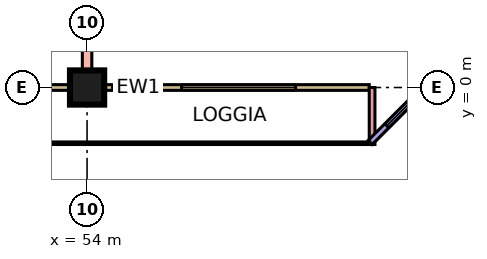
"""IFC4 building model, lengths in metres.
Left out: names, types, materials, properties, quantities, classifications, styles, units other than length and angle.
Written with IfcOpenShell. Run it as: python <this file> out.ifc"""

import sys

from ifc_helpers import new_model, si_unit, direction, frame, frame_2d, origin, origin_2d, place, context, subcontext, project, spatial, rectangle, extrude, element, fill, save


model = new_model("IFC4")
c1 = context("Model", 3, precision=1e-05, world=origin(), true_north=direction((0.0, 1.0)))
c2 = subcontext(c1, "Body", "Model", "MODEL_VIEW")
j1 = project(units=[si_unit("LENGTHUNIT", "METRE"), si_unit("PLANEANGLEUNIT", "RADIAN")], contexts=[c1])
p1 = place(None, origin())
s1 = spatial("IfcSite", under=j1, at=p1, CompositionType="ELEMENT")
p2 = place(p1, origin())
s2 = spatial("IfcBuilding", under=s1, at=p2, CompositionType="ELEMENT")
p3 = place(p2, frame((0.0, 0.0, 206.15)))
s3 = spatial("IfcBuildingStorey", under=s2, at=p3, CompositionType="ELEMENT", Elevation=206.15)
p4 = place(p3, frame((54.0, 0.0, 0.0), z_axis=(0.0, 0.0, 1.0), x_axis=(1.0, 0.0, 0.0)))
e1 = element("IfcColumn", 1, at=p4, inside=s3, PredefinedType="COLUMN", context=c2, shape_type="SweptSolid", body=[
    extrude(rectangle(XDim=0.9, YDim=0.9, at=origin_2d()), origin(), (0.0, 0.0, 1.0), 5.5),
])
p5 = place(p3, frame((48.075, 0.0, 0.0), z_axis=(0.0, 0.0, 1.0), x_axis=(1.0, 0.0, 0.0)))
e2 = element("IfcWall", 2, at=p5, inside=s3, PredefinedType="SOLIDWALL", context=c2, shape_type="SweptSolid", body=[
    extrude(rectangle(XDim=13.35, YDim=0.15, at=frame_2d((6.675, 0.0))), origin(), (0.0, 0.0, 1.0), 5.1),
])
p6 = place(p5, frame((1.188, 0.0, 0.45)))
e3 = element("IfcOpeningElement", 3, at=p6, cuts=e2, PredefinedType="OPENING", context=c2, shape_type="SweptSolid", body=[
    extrude(rectangle(XDim=3.0, YDim=3.6, at=frame_2d((1.5, 1.8))), frame((0.0, 0.085, 0.0), z_axis=(0.0, -1.0, 0.0), x_axis=(1.0, 0.0, 0.0)), (0.0, 0.0, 1.0), 0.17),
])
p7 = place(p5, frame((8.413, 0.0, 0.45)))
e4 = element("IfcOpeningElement", 4, at=p7, cuts=e2, PredefinedType="OPENING", context=c2, shape_type="SweptSolid", body=[
    extrude(rectangle(XDim=3.0, YDim=3.6, at=frame_2d((1.5, 1.8))), frame((0.0, 0.085, 0.0), z_axis=(0.0, -1.0, 0.0), x_axis=(1.0, 0.0, 0.0)), (0.0, 0.0, 1.0), 0.17),
])
p8 = place(p3, frame((61.5, -1.5, 0.0), z_axis=(0.0, 0.0, 1.0), x_axis=(0.0, 1.0, 0.0)))
e5 = element("IfcWall", 5, at=p8, inside=s3, PredefinedType="SOLIDWALL", context=c2, shape_type="SweptSolid", body=[
    extrude(rectangle(XDim=1.5, YDim=0.15, at=frame_2d((0.75, 0.0))), origin(), (0.0, 0.0, 1.0), 5.1),
])
p9 = place(p3, frame((61.447, -1.447, 0.0), z_axis=(0.0, 0.0, 1.0), x_axis=(0.707106781187, 0.707106781187, 0.0)))
e6 = element("IfcWall", 6, at=p9, inside=s3, PredefinedType="SOLIDWALL", context=c2, shape_type="SweptSolid", body=[
    extrude(rectangle(XDim=4.243, YDim=0.15, at=frame_2d((2.121, 0.0))), origin(), (0.0, 0.0, 1.0), 5.1),
])
p10 = place(p9, frame((0.621, 0.0, 0.45)))
e7 = element("IfcOpeningElement", 7, at=p10, cuts=e6, PredefinedType="OPENING", context=c2, shape_type="SweptSolid", body=[
    extrude(rectangle(XDim=3.0, YDim=3.6, at=frame_2d((1.5, 1.8))), frame((0.0, 0.085, 0.0), z_axis=(0.0, -1.0, 0.0), x_axis=(1.0, 0.0, 0.0)), (0.0, 0.0, 1.0), 0.17),
])
p11 = place(p3, frame((54.0, 0.074, 0.0), z_axis=(0.0, 0.0, 1.0), x_axis=(0.0, 1.0, 0.0)))
e8 = element("IfcWall", 8, at=p11, inside=s3, PredefinedType="PARTITIONING", context=c2, shape_type="SweptSolid", body=[
    extrude(rectangle(XDim=11.527, YDim=0.25, at=frame_2d((5.764, 0.0))), origin(), (0.0, 0.0, 1.0), 5.1),
])
p12 = place(p7, origin())
e9 = element("IfcWindow", 9, at=p12, inside=s3, PartitioningType="SINGLE_PANEL", PredefinedType="WINDOW", context=c2, shape_type="SweptSolid", body=[
    extrude(rectangle(XDim=3.0, YDim=3.6, at=frame_2d((1.5, 1.8))), frame((0.0, 0.03, 0.0), z_axis=(0.0, -1.0, 0.0), x_axis=(1.0, 0.0, 0.0)), (0.0, 0.0, 1.0), 0.06),
])
fill(e4, e9)
p13 = place(p10, origin())
e10 = element("IfcWindow", 10, at=p13, inside=s3, PartitioningType="SINGLE_PANEL", PredefinedType="WINDOW", context=c2, shape_type="SweptSolid", body=[
    extrude(rectangle(XDim=3.0, YDim=3.6, at=frame_2d((1.5, 1.8))), frame((0.0, 0.03, 0.0), z_axis=(0.0, -1.0, 0.0), x_axis=(1.0, 0.0, 0.0)), (0.0, 0.0, 1.0), 0.06),
])
fill(e7, e10)
save(model, sys.argv[1])
